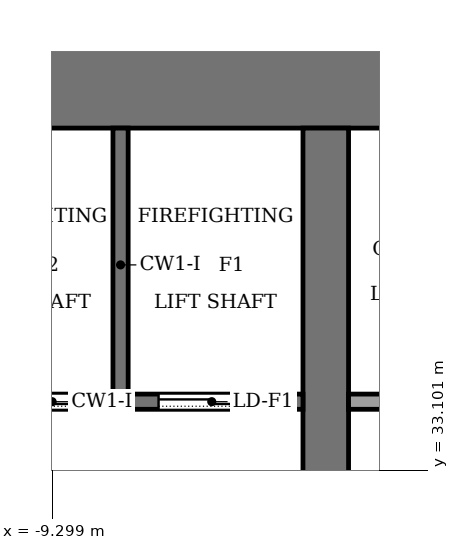
"""IFC4 building model, lengths in metres.
Left out: names, types, materials, properties, quantities, classifications, styles, units other than length and angle.
Written with IfcOpenShell. Run it as: python <this file> out.ifc"""

import sys

from ifc_helpers import new_model, si_unit, direction, frame, frame_2d, origin, place, context, subcontext, project, spatial, rectangle, extrude, element, fill, save


model = new_model("IFC4")
c1 = context("Model", 3, precision=1e-05, world=origin(), true_north=direction((0.0, 1.0)))
c2 = subcontext(c1, "Body", "Model", "MODEL_VIEW")
j1 = project(units=[si_unit("LENGTHUNIT", "METRE"), si_unit("PLANEANGLEUNIT", "RADIAN")], contexts=[c1])
p1 = place(None, origin())
s1 = spatial("IfcSite", under=j1, at=p1, CompositionType="ELEMENT")
p2 = place(p1, origin())
s2 = spatial("IfcBuilding", under=s1, at=p2, CompositionType="ELEMENT")
p3 = place(p2, frame((0.0, 0.0, 110.0)))
s3 = spatial("IfcBuildingStorey", under=s2, at=p3, CompositionType="ELEMENT", Elevation=110.0)
p4 = place(p3, frame((-13.8, 38.2, -0.13), z_axis=(0.0, 0.0, 1.0), x_axis=(1.0, 0.0, 0.0)))
e1 = element("IfcWall", 1, at=p4, inside=s3, PredefinedType="SHEAR", context=c2, shape_type="SweptSolid", body=[
    extrude(rectangle(XDim=27.6, YDim=1.2, at=frame_2d((13.8, 0.0))), origin(), (0.0, 0.0, 1.0), 3.88),
])
p5 = place(p3, frame((-5.7, 18.4, -0.13), z_axis=(0.0, 0.0, 1.0), x_axis=(0.0, 1.0, 0.0)))
e2 = element("IfcWall", 2, at=p5, inside=s3, PredefinedType="SHEAR", context=c2, shape_type="SweptSolid", body=[
    extrude(rectangle(XDim=19.2, YDim=0.6, at=frame_2d((9.6, 0.0))), origin(), (0.0, 0.0, 1.0), 3.88),
])
p6 = place(p5, frame((8.35, 0.0, 0.13)))
e3 = element("IfcOpeningElement", 3, at=p6, cuts=e2, PredefinedType="OPENING", context=c2, shape_type="SweptSolid", body=[
    extrude(rectangle(XDim=0.9, YDim=2.1, at=frame_2d((0.45, 1.05))), frame((0.0, 0.31, 0.0), z_axis=(0.0, -1.0, 0.0), x_axis=(1.0, 0.0, 0.0)), (0.0, 0.0, 1.0), 0.62),
])
p7 = place(p3, frame((-12.6, 34.0, 0.0), z_axis=(0.0, 0.0, 1.0), x_axis=(1.0, 0.0, 0.0)))
e4 = element("IfcWall", 4, at=p7, inside=s3, PredefinedType="PARTITIONING", context=c2, shape_type="SweptSolid", body=[
    extrude(rectangle(XDim=6.6, YDim=0.2, at=frame_2d((3.3, 0.0))), origin(), (0.0, 0.0, 1.0), 3.75),
])
p8 = place(p7, frame((4.7, 0.0, 0.0)))
e5 = element("IfcOpeningElement", 5, at=p8, cuts=e4, PredefinedType="OPENING", context=c2, shape_type="SweptSolid", body=[
    extrude(rectangle(XDim=1.4, YDim=2.2, at=frame_2d((0.7, 1.1))), frame((0.0, 0.11, 0.0), z_axis=(0.0, -1.0, 0.0), x_axis=(1.0, 0.0, 0.0)), (0.0, 0.0, 1.0), 0.22),
])
p9 = place(p7, frame((2.3, 0.0, 0.0)))
e6 = element("IfcOpeningElement", 6, at=p9, cuts=e4, PredefinedType="OPENING", context=c2, shape_type="SweptSolid", body=[
    extrude(rectangle(XDim=1.4, YDim=2.2, at=frame_2d((0.7, 1.1))), frame((0.0, 0.11, 0.0), z_axis=(0.0, -1.0, 0.0), x_axis=(1.0, 0.0, 0.0)), (0.0, 0.0, 1.0), 0.22),
])
p10 = place(p7, frame((0.45, 0.0, 0.0)))
e7 = element("IfcOpeningElement", 7, at=p10, cuts=e4, PredefinedType="OPENING", context=c2, shape_type="SweptSolid", body=[
    extrude(rectangle(XDim=0.9, YDim=2.1, at=frame_2d((0.45, 1.05))), frame((0.0, 0.11, 0.0), z_axis=(0.0, -1.0, 0.0), x_axis=(1.0, 0.0, 0.0)), (0.0, 0.0, 1.0), 0.22),
])
p11 = place(p3, frame((-5.4, 34.0, 0.0), z_axis=(0.0, 0.0, 1.0), x_axis=(1.0, 0.0, 0.0)))
e8 = element("IfcWall", 8, at=p11, inside=s3, PredefinedType="PARTITIONING", context=c2, shape_type="SweptSolid", body=[
    extrude(rectangle(XDim=10.8, YDim=0.2, at=frame_2d((5.4, 0.0))), origin(), (0.0, 0.0, 1.0), 3.75),
])
p12 = place(p11, frame((6.15, 0.0, 0.0)))
e9 = element("IfcOpeningElement", 9, at=p12, cuts=e8, PredefinedType="OPENING", context=c2, shape_type="SweptSolid", body=[
    extrude(rectangle(XDim=1.2, YDim=2.2, at=frame_2d((0.6, 1.1))), frame((0.0, 0.11, 0.0), z_axis=(0.0, -1.0, 0.0), x_axis=(1.0, 0.0, 0.0)), (0.0, 0.0, 1.0), 0.22),
])
p13 = place(p11, frame((8.95, 0.0, 0.0)))
e10 = element("IfcOpeningElement", 10, at=p13, cuts=e8, PredefinedType="OPENING", context=c2, shape_type="SweptSolid", body=[
    extrude(rectangle(XDim=1.0, YDim=2.1, at=frame_2d((0.5, 1.05))), frame((0.0, 0.11, 0.0), z_axis=(0.0, -1.0, 0.0), x_axis=(1.0, 0.0, 0.0)), (0.0, 0.0, 1.0), 0.22),
])
p14 = place(p3, frame((-8.4, 34.0, 0.0), z_axis=(0.0, 0.0, 1.0), x_axis=(0.0, 1.0, 0.0)))
e11 = element("IfcWall", 11, at=p14, inside=s3, PredefinedType="PARTITIONING", context=c2, shape_type="SweptSolid", body=[
    extrude(rectangle(XDim=3.6, YDim=0.2, at=frame_2d((1.8, 0.0))), origin(), (0.0, 0.0, 1.0), 3.75),
])
p15 = place(p8, origin())
e12 = element("IfcDoor", 12, at=p15, inside=s3, OperationType="SLIDING_TO_LEFT", PredefinedType="DOOR", context=c2, shape_type="SweptSolid", body=[
    extrude(rectangle(XDim=1.4, YDim=2.2, at=frame_2d((0.7, 1.1))), frame((0.0, 0.025, 0.0), z_axis=(0.0, -1.0, 0.0), x_axis=(1.0, 0.0, 0.0)), (0.0, 0.0, 1.0), 0.05),
])
fill(e5, e12)
p16 = place(p9, origin())
e13 = element("IfcDoor", 13, at=p16, inside=s3, OperationType="SLIDING_TO_LEFT", PredefinedType="DOOR", context=c2, shape_type="SweptSolid", body=[
    extrude(rectangle(XDim=1.4, YDim=2.2, at=frame_2d((0.7, 1.1))), frame((0.0, 0.025, 0.0), z_axis=(0.0, -1.0, 0.0), x_axis=(1.0, 0.0, 0.0)), (0.0, 0.0, 1.0), 0.05),
])
fill(e6, e13)
save(model, sys.argv[1])
